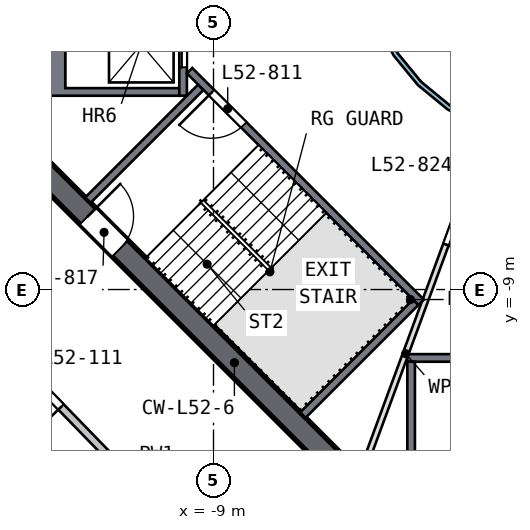
"""IFC4 building model, lengths in metres.
Left out: names, types, materials, properties, quantities, classifications, styles, units other than length and angle.
Written with IfcOpenShell. Run it as: python <this file> out.ifc"""

import sys

from ifc_helpers import new_model, si_unit, direction, frame, frame_2d, origin, place, context, subcontext, project, spatial, polyline, rectangle, outline, extrude, element, fill, save


model = new_model("IFC4")
c1 = context("Model", 3, precision=1e-05, world=origin(), true_north=direction((0.0, 1.0)))
c2 = subcontext(c1, "Body", "Model", "MODEL_VIEW")
j1 = project(units=[si_unit("LENGTHUNIT", "METRE"), si_unit("PLANEANGLEUNIT", "RADIAN")], contexts=[c1])
p1 = place(None, origin())
s1 = spatial("IfcSite", under=j1, at=p1, CompositionType="ELEMENT")
p2 = place(p1, origin())
s2 = spatial("IfcBuilding", under=s1, at=p2, CompositionType="ELEMENT")
p3 = place(p2, frame((0.0, 0.0, 212.5)))
s3 = spatial("IfcBuildingStorey", under=s2, at=p3, CompositionType="ELEMENT", Elevation=212.5)
p4 = place(p3, frame((-13.788, -5.587, 0.0), z_axis=(0.0, 0.0, 1.0), x_axis=(0.707106781, -0.707106781, 0.0)))
e1 = element("IfcWall", 1, at=p4, inside=s3, PredefinedType="SHEAR", context=c2, shape_type="SweptSolid", body=[
    extrude(rectangle(XDim=11.598, YDim=0.6, at=frame_2d((5.799, 0.0))), origin(), (0.0, 0.0, 1.0), 3.5),
])
p5 = place(p4, frame((2.099, 0.0, 0.0)))
e2 = element("IfcOpeningElement", 2, at=p5, cuts=e1, PredefinedType="OPENING", context=c2, shape_type="SweptSolid", body=[
    extrude(rectangle(XDim=1.2, YDim=2.1, at=frame_2d((0.6, 1.05))), frame((0.0, 0.31, 0.0), z_axis=(0.0, -1.0, 0.0), x_axis=(1.0, 0.0, 0.0)), (0.0, 0.0, 1.0), 0.62),
])
p6 = place(p3, origin())
e3 = element("IfcWall", 3, at=p6, inside=s3, PredefinedType="SOLIDWALL", context=c2, shape_type="SweptSolid", body=[
    extrude(outline(polyline([(-13.4, -3.9), (-13.4, -1.2), (-9.9, -1.2), (-9.9, -1.4), (-12.9, -1.4), (-12.9, -3.7), (-9.9, -3.7), (-9.9, -3.9), (-13.4, -3.9)])), origin(), (0.0, 0.0, 1.0), 3.0),
])
p7 = place(p3, frame((-9.8, -1.2, 0.0), z_axis=(0.0, 0.0, 1.0), x_axis=(0.0, -1.0, 0.0)))
e4 = element("IfcWall", 4, at=p7, inside=s3, PredefinedType="SOLIDWALL", context=c2, shape_type="SweptSolid", body=[
    extrude(rectangle(XDim=2.7, YDim=0.2, at=frame_2d((1.35, 0.0))), origin(), (0.0, 0.0, 1.0), 3.0),
])
p8 = place(p7, frame((0.75, 0.0, 0.0)))
e5 = element("IfcOpeningElement", 5, at=p8, cuts=e4, PredefinedType="OPENING", context=c2, shape_type="SweptSolid", body=[
    extrude(rectangle(XDim=1.2, YDim=2.1, at=frame_2d((0.6, 1.05))), frame((0.0, 0.11, 0.0), z_axis=(0.0, -1.0, 0.0), x_axis=(1.0, 0.0, 0.0)), (0.0, 0.0, 1.0), 0.22),
])
p9 = place(p3, frame((-3.9, -10.8, 0.0), z_axis=(0.0, 0.0, 1.0), x_axis=(1.0, 0.0, 0.0)))
e6 = element("IfcWall", 6, at=p9, inside=s3, PredefinedType="SOLIDWALL", context=c2, shape_type="SweptSolid", body=[
    extrude(rectangle(XDim=7.8, YDim=0.2, at=frame_2d((3.9, 0.0))), origin(), (0.0, 0.0, 1.0), 3.0),
])
p10 = place(p9, frame((3.45, 0.0, 0.0)))
e7 = element("IfcOpeningElement", 7, at=p10, cuts=e6, PredefinedType="OPENING", context=c2, shape_type="SweptSolid", body=[
    extrude(rectangle(XDim=0.9, YDim=2.1, at=frame_2d((0.45, 1.05))), frame((0.0, 0.11, 0.0), z_axis=(0.0, -1.0, 0.0), x_axis=(1.0, 0.0, 0.0)), (0.0, 0.0, 1.0), 0.22),
])
p11 = place(p3, frame((-3.8, -10.9, 0.0), z_axis=(0.0, 0.0, 1.0), x_axis=(0.0, -1.0, 0.0)))
e8 = element("IfcWall", 8, at=p11, inside=s3, PredefinedType="SOLIDWALL", context=c2, shape_type="SweptSolid", body=[
    extrude(rectangle(XDim=2.5, YDim=0.2, at=frame_2d((1.25, 0.0))), origin(), (0.0, 0.0, 1.0), 3.0),
])
p12 = place(p3, frame((-3.535, -9.334, 0.0), z_axis=(0.0, 0.0, 1.0), x_axis=(-0.707120946, 0.707092617, 0.0)))
e9 = element("IfcWall", 9, at=p12, inside=s3, PredefinedType="SOLIDWALL", context=c2, shape_type="SweptSolid", body=[
    extrude(rectangle(XDim=8.618, YDim=0.2, at=frame_2d((4.309, 0.0))), origin(), (0.0, 0.0, 1.0), 3.0),
])
p13 = place(p12, frame((6.6, 0.0, 0.0)))
e10 = element("IfcOpeningElement", 10, at=p13, cuts=e9, PredefinedType="OPENING", context=c2, shape_type="SweptSolid", body=[
    extrude(rectangle(XDim=1.2, YDim=2.1, at=frame_2d((0.6, 1.05))), frame((0.0, 0.11, 0.0), z_axis=(0.0, -1.0, 0.0), x_axis=(1.0, 0.0, 0.0)), (0.0, 0.0, 1.0), 0.22),
])
for number, where, z_axis, x_axis in (
    (11, (-9.334, -3.677, 0.0), (0.0, 0.0, 1.0), (-0.707, -0.707, 0.0)),
    (12, (-3.677, -9.334, 0.0), (0.0, 0.0, 1.0), (-0.707, -0.707, 0.0)),
):
    element("IfcWall", number, at=place(p3, frame(where, z_axis=z_axis, x_axis=x_axis)), inside=s3, PredefinedType="SOLIDWALL", context=c2, shape_type="SweptSolid", body=[
        extrude(rectangle(XDim=4.2, YDim=0.2, at=frame_2d((2.1, 0.0))), origin(), (0.0, 0.0, 1.0), 3.0),
    ])
p14 = place(p3, frame((-1.776, -4.813, 0.0), z_axis=(0.0, 0.0, 1.0), x_axis=(-0.346112108, -0.938193162, 0.0)))
e13 = element("IfcWall", 13, at=p14, inside=s3, PredefinedType="PARTITIONING", context=c2, shape_type="SweptSolid", body=[
    extrude(rectangle(XDim=9.123, YDim=0.15, at=frame_2d((4.562, 0.0))), origin(), (0.0, 0.0, 1.0), 3.0),
])
p15 = place(p14, frame((1.4, 0.0, 0.0)))
e14 = element("IfcOpeningElement", 14, at=p15, cuts=e13, PredefinedType="OPENING", context=c2, shape_type="SweptSolid", body=[
    extrude(rectangle(XDim=1.8, YDim=2.1, at=frame_2d((0.9, 1.05))), frame((0.0, 0.085, 0.0), z_axis=(0.0, -1.0, 0.0), x_axis=(1.0, 0.0, 0.0)), (0.0, 0.0, 1.0), 0.17),
])
p16 = place(p3, origin())
e15 = element("IfcWall", 15, at=p16, inside=s3, PredefinedType="SOLIDWALL", context=c2, shape_type="SweptSolid", body=[
    extrude(outline(polyline([(5.021, -0.999), (4.73, -1.959), (4.257, -2.844), (3.62, -3.62), (2.844, -4.257), (1.959, -4.73), (0.999, -5.021), (0.0, -5.12), (-0.999, -5.021), (-1.959, -4.73), (-2.844, -4.257), (-3.62, -3.62), (-4.257, -2.844), (-4.73, -1.959), (-5.021, -0.999), (-5.12, 0.0), (-5.021, 0.999), (-4.73, 1.959), (-4.257, 2.844), (-3.62, 3.62), (-2.844, 4.257), (-1.959, 4.73), (-0.999, 5.021), (0.0, 5.12), (0.999, 5.021), (1.959, 4.73), (2.844, 4.257), (3.62, 3.62), (4.257, 2.844), (4.73, 1.959), (5.021, 0.999), (5.12, 0.0), (5.021, -0.999)]), holes=[polyline([(4.904, 0.976), (4.619, 1.913), (4.157, 2.778), (3.535, 3.535), (2.778, 4.157), (1.913, 4.619), (0.976, 4.904), (0.0, 5.0), (-0.976, 4.904), (-1.913, 4.619), (-2.778, 4.157), (-3.535, 3.535), (-4.157, 2.778), (-4.619, 1.913), (-4.904, 0.976), (-5.0, 0.0), (-4.904, -0.976), (-4.619, -1.913), (-4.157, -2.778), (-3.535, -3.535), (-2.778, -4.157), (-1.913, -4.619), (-0.976, -4.904), (0.0, -5.0), (0.976, -4.904), (1.913, -4.619), (2.778, -4.157), (3.535, -3.535), (4.157, -2.778), (4.619, -1.913), (4.904, -0.976), (5.0, 0.0), (4.904, 0.976)])]), origin(), (0.0, 0.0, 1.0), 3.0),
])
p17 = place(p3, frame((-9.425, -15.785, 0.0), z_axis=(0.0, 0.0, 1.0), x_axis=(-0.696666645, 0.717395, 0.0)))
e16 = element("IfcWall", 16, at=p17, inside=s3, PredefinedType="SOLIDWALL", context=c2, shape_type="SweptSolid", body=[
    extrude(rectangle(XDim=9.316, YDim=0.2, at=frame_2d((4.658, 0.0))), origin(), (0.0, 0.0, 1.0), 3.0),
])
p18 = place(p17, frame((5.15, 0.0, 0.0)))
e17 = element("IfcOpeningElement", 17, at=p18, cuts=e16, PredefinedType="OPENING", context=c2, shape_type="SweptSolid", body=[
    extrude(rectangle(XDim=1.0, YDim=2.1, at=frame_2d((0.5, 1.05))), frame((0.0, 0.11, 0.0), z_axis=(0.0, -1.0, 0.0), x_axis=(1.0, 0.0, 0.0)), (0.0, 0.0, 1.0), 0.22),
])
p19 = place(p8, origin())
e18 = element("IfcDoor", 18, at=p19, inside=s3, OperationType="DOUBLE_DOOR_SLIDING", PredefinedType="DOOR", context=c2, shape_type="SweptSolid", body=[
    extrude(rectangle(XDim=1.2, YDim=2.1, at=frame_2d((0.6, 1.05))), frame((0.0, 0.025, 0.0), z_axis=(0.0, -1.0, 0.0), x_axis=(1.0, 0.0, 0.0)), (0.0, 0.0, 1.0), 0.05),
])
fill(e5, e18)
p20 = place(p13, origin())
e19 = element("IfcDoor", 19, at=p20, inside=s3, OperationType="SINGLE_SWING_RIGHT", PredefinedType="DOOR", context=c2, shape_type="SweptSolid", body=[
    extrude(rectangle(XDim=1.2, YDim=2.1, at=frame_2d((0.6, 1.05))), frame((0.0, 0.025, 0.0), z_axis=(0.0, -1.0, 0.0), x_axis=(1.0, 0.0, 0.0)), (0.0, 0.0, 1.0), 0.05),
])
fill(e10, e19)
p21 = place(p5, origin())
e20 = element("IfcDoor", 20, at=p21, inside=s3, OperationType="SINGLE_SWING_LEFT", PredefinedType="DOOR", context=c2, shape_type="SweptSolid", body=[
    extrude(rectangle(XDim=1.2, YDim=2.1, at=frame_2d((0.6, 1.05))), frame((0.0, 0.025, 0.0), z_axis=(0.0, -1.0, 0.0), x_axis=(1.0, 0.0, 0.0)), (0.0, 0.0, 1.0), 0.05),
])
fill(e2, e20)
p22 = place(p15, origin())
e21 = element("IfcDoor", 21, at=p22, inside=s3, OperationType="DOUBLE_DOOR_SINGLE_SWING", PredefinedType="DOOR", context=c2, shape_type="SweptSolid", body=[
    extrude(rectangle(XDim=1.8, YDim=2.1, at=frame_2d((0.9, 1.05))), frame((0.0, 0.025, 0.0), z_axis=(0.0, -1.0, 0.0), x_axis=(1.0, 0.0, 0.0)), (0.0, 0.0, 1.0), 0.05),
])
fill(e14, e21)
p23 = place(p18, origin())
e22 = element("IfcDoor", 22, at=p23, inside=s3, OperationType="SINGLE_SWING_LEFT", PredefinedType="DOOR", context=c2, shape_type="SweptSolid", body=[
    extrude(rectangle(XDim=1.0, YDim=2.1, at=frame_2d((0.5, 1.05))), frame((0.0, 0.025, 0.0), z_axis=(0.0, -1.0, 0.0), x_axis=(1.0, 0.0, 0.0)), (0.0, 0.0, 1.0), 0.05),
])
fill(e17, e22)
save(model, sys.argv[1])
